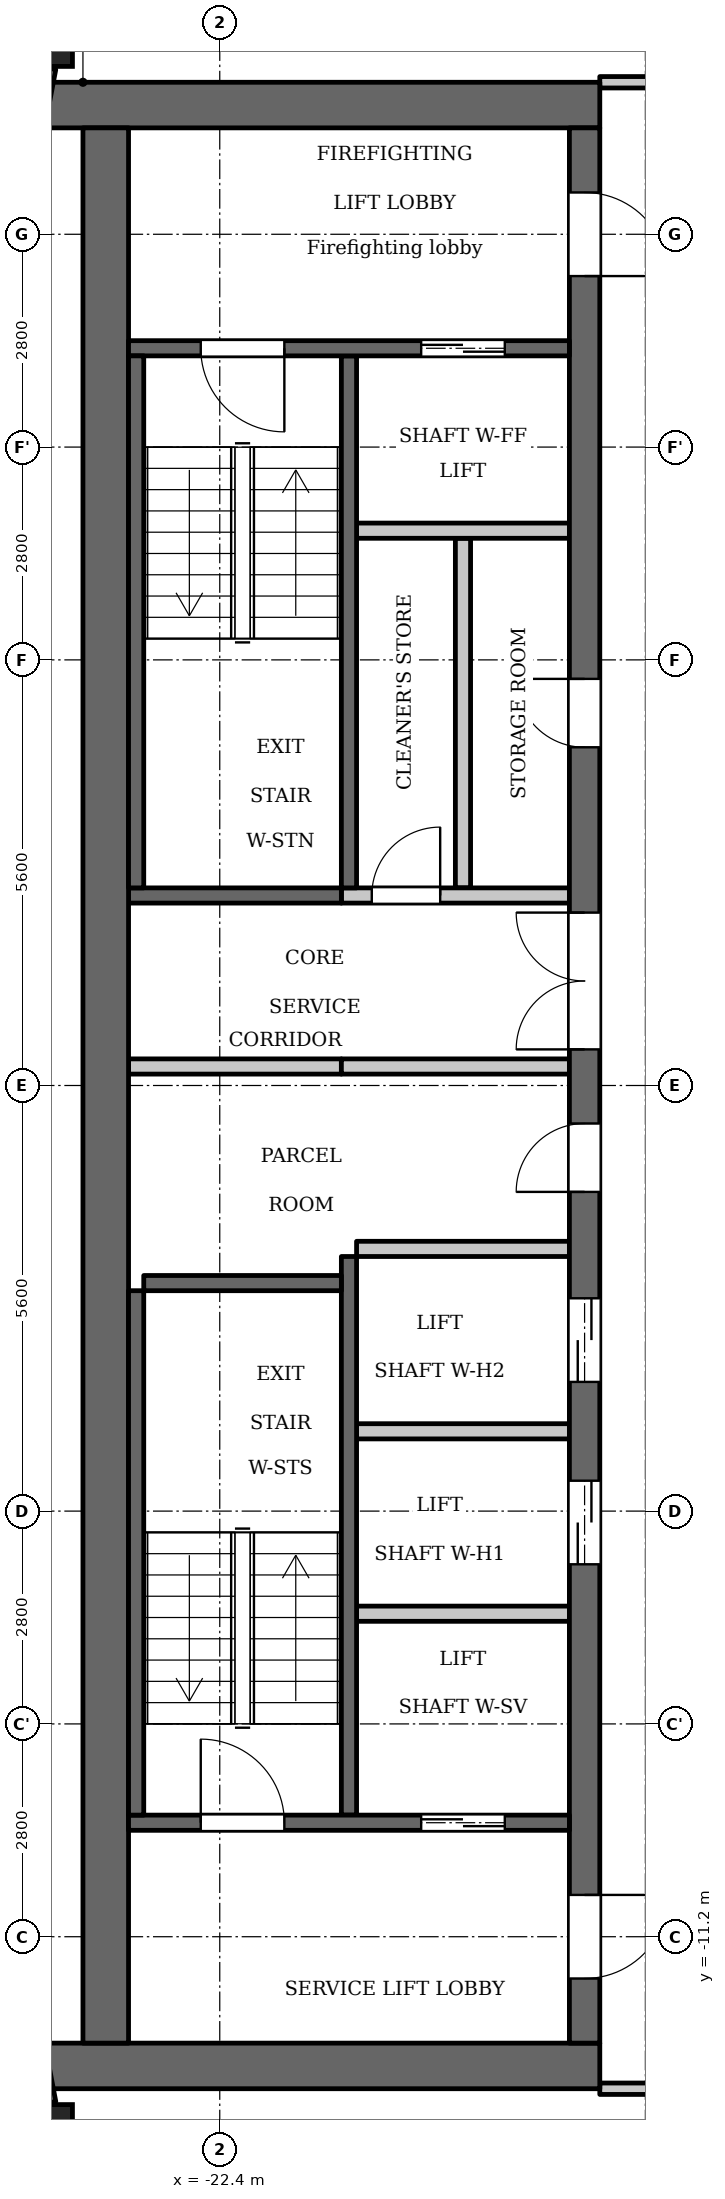
"""IFC4 building model, lengths in metres.
Left out: names, types, materials, properties, quantities, classifications, styles, units other than length and angle.
Written with IfcOpenShell. Run it as: python <this file> out.ifc"""

import sys

from ifc_helpers import new_model, si_unit, direction, frame, frame_2d, origin, origin_2d, place, context, subcontext, project, spatial, rectangle, extrude, element, fill, save


model = new_model("IFC4")
c1 = context("Model", 3, precision=1e-05, world=origin(), true_north=direction((0.0, 1.0)))
c2 = subcontext(c1, "Body", "Model", "MODEL_VIEW")
j1 = project(units=[si_unit("LENGTHUNIT", "METRE"), si_unit("PLANEANGLEUNIT", "RADIAN")], contexts=[c1])
p1 = place(None, origin())
s1 = spatial("IfcSite", under=j1, at=p1, CompositionType="ELEMENT")
p2 = place(p1, origin())
s2 = spatial("IfcBuilding", under=s1, at=p2, CompositionType="ELEMENT")
p3 = place(p2, frame((0.0, 0.0, 248.7)))
s3 = spatial("IfcBuildingStorey", under=s2, at=p3, CompositionType="ELEMENT", Elevation=248.7)
for number, where, z_axis, x_axis in (
    (1, (-24.738, 13.809, 0.0), (0.0, 0.0, 1.0), (1.0, 0.0, 0.0)),
    (2, (-24.738, -13.809, 0.0), (0.0, 0.0, 1.0), (1.0, 0.0, 0.0)),
):
    element("IfcColumn", number, at=place(p3, frame(where, z_axis=z_axis, x_axis=x_axis)), inside=s3, PredefinedType="COLUMN", context=c2, shape_type="SweptSolid", body=[
        extrude(rectangle(XDim=0.8, YDim=0.8, at=origin_2d()), origin(), (0.0, 0.0, 1.0), 3.5),
    ])
for number, where, z_axis, x_axis in (
    (3, (-24.705, 13.395, 0.0), (0.0, 0.0, 1.0), (-0.187, -0.982, 0.0)),
    (4, (-25.053, -11.572, 0.0), (0.0, 0.0, 1.0), (0.187, -0.982, 0.0)),
):
    element("IfcWall", number, at=place(p3, frame(where, z_axis=z_axis, x_axis=x_axis)), inside=s3, PredefinedType="SOLIDWALL", context=c2, shape_type="SweptSolid", body=[
        extrude(rectangle(XDim=1.856, YDim=0.3, at=frame_2d((0.928, 0.0))), origin(), (0.0, 0.0, 1.0), 2.55),
    ])
p4 = place(p3, frame((-20.7, 2.6, 0.0), z_axis=(0.0, 0.0, 1.0), x_axis=(0.0, 1.0, 0.0)))
e5 = element("IfcWall", 5, at=p4, inside=s3, PredefinedType="SHEAR", context=c2, shape_type="SweptSolid", body=[
    extrude(rectangle(XDim=7.0, YDim=0.2, at=frame_2d((3.5, 0.0))), origin(), (0.0, 0.0, 1.0), 3.2),
])
p5 = place(p3, frame((-20.7, -9.6, 0.0), z_axis=(0.0, 0.0, 1.0), x_axis=(0.0, 1.0, 0.0)))
e6 = element("IfcWall", 6, at=p5, inside=s3, PredefinedType="SHEAR", context=c2, shape_type="SweptSolid", body=[
    extrude(rectangle(XDim=7.35, YDim=0.2, at=frame_2d((3.675, 0.0))), origin(), (0.0, 0.0, 1.0), 3.2),
])
p6 = place(p3, frame((-20.8, 2.5, 0.0), z_axis=(0.0, 0.0, 1.0), x_axis=(-1.0, 0.0, 0.0)))
e7 = element("IfcWall", 7, at=p6, inside=s3, PredefinedType="SHEAR", context=c2, shape_type="SweptSolid", body=[
    extrude(rectangle(XDim=2.8, YDim=0.2, at=frame_2d((1.4, 0.0))), origin(), (0.0, 0.0, 1.0), 3.2),
])
p7 = place(p3, frame((-20.8, 0.25, 0.0), z_axis=(0.0, 0.0, 1.0), x_axis=(-1.0, 0.0, 0.0)))
e8 = element("IfcWall", 8, at=p7, inside=s3, PredefinedType="PARTITIONING", context=c2, shape_type="SweptSolid", body=[
    extrude(rectangle(XDim=2.8, YDim=0.2, at=frame_2d((1.4, 0.0))), origin(), (0.0, 0.0, 1.0), 3.2),
])
for number, where, z_axis, x_axis in (
    (9, (-17.4, 12.9, 0.0), (0.0, 0.0, 1.0), (-1.0, 0.0, 0.0)),
    (10, (-17.4, -12.9, 0.0), (0.0, 0.0, 1.0), (-1.0, 0.0, 0.0)),
):
    element("IfcWall", number, at=place(p3, frame(where, z_axis=z_axis, x_axis=x_axis)), inside=s3, PredefinedType="SHEAR", context=c2, shape_type="SweptSolid", body=[
        extrude(rectangle(XDim=7.32, YDim=0.6, at=frame_2d((3.66, 0.0))), origin(), (0.0, 0.0, 1.0), 3.2),
    ])
p8 = place(p3, frame((-19.2, 2.6, 0.0), z_axis=(0.0, 0.0, 1.0), x_axis=(0.0, 1.0, 0.0)))
e11 = element("IfcWall", 11, at=p8, inside=s3, PredefinedType="PARTITIONING", context=c2, shape_type="SweptSolid", body=[
    extrude(rectangle(XDim=4.6, YDim=0.2, at=frame_2d((2.3, 0.0))), origin(), (0.0, 0.0, 1.0), 3.2),
])
p9 = place(p3, frame((-17.6, -12.6, 0.0), z_axis=(0.0, 0.0, 1.0), x_axis=(0.0, 1.0, 0.0)))
e12 = element("IfcWall", 12, at=p9, inside=s3, PredefinedType="SHEAR", context=c2, shape_type="SweptSolid", body=[
    extrude(rectangle(XDim=25.2, YDim=0.4, at=frame_2d((12.6, 0.0))), origin(), (0.0, 0.0, 1.0), 3.2),
])
p10 = place(p9, frame((6.3, 0.0, 0.0)))
e13 = element("IfcOpeningElement", 13, at=p10, cuts=e12, PredefinedType="OPENING", context=c2, shape_type="SweptSolid", body=[
    extrude(rectangle(XDim=1.1, YDim=2.1, at=frame_2d((0.55, 1.05))), frame((0.0, 0.21, 0.0), z_axis=(0.0, -1.0, 0.0), x_axis=(1.0, 0.0, 0.0)), (0.0, 0.0, 1.0), 0.42),
])
p11 = place(p9, frame((8.7, 0.0, 0.0)))
e14 = element("IfcOpeningElement", 14, at=p11, cuts=e12, PredefinedType="OPENING", context=c2, shape_type="SweptSolid", body=[
    extrude(rectangle(XDim=1.1, YDim=2.1, at=frame_2d((0.55, 1.05))), frame((0.0, 0.21, 0.0), z_axis=(0.0, -1.0, 0.0), x_axis=(1.0, 0.0, 0.0)), (0.0, 0.0, 1.0), 0.42),
])
p12 = place(p9, frame((11.2, 0.0, 0.0)))
e15 = element("IfcOpeningElement", 15, at=p12, cuts=e12, PredefinedType="OPENING", context=c2, shape_type="SweptSolid", body=[
    extrude(rectangle(XDim=0.9, YDim=2.1, at=frame_2d((0.45, 1.05))), frame((0.0, 0.21, 0.0), z_axis=(0.0, -1.0, 0.0), x_axis=(1.0, 0.0, 0.0)), (0.0, 0.0, 1.0), 0.42),
])
p13 = place(p9, frame((17.05, 0.0, 0.0)))
e16 = element("IfcOpeningElement", 16, at=p13, cuts=e12, PredefinedType="OPENING", context=c2, shape_type="SweptSolid", body=[
    extrude(rectangle(XDim=0.9, YDim=2.1, at=frame_2d((0.45, 1.05))), frame((0.0, 0.21, 0.0), z_axis=(0.0, -1.0, 0.0), x_axis=(1.0, 0.0, 0.0)), (0.0, 0.0, 1.0), 0.42),
])
p14 = place(p9, frame((23.25, 0.0, 0.0)))
e17 = element("IfcOpeningElement", 17, at=p14, cuts=e12, PredefinedType="OPENING", context=c2, shape_type="SweptSolid", body=[
    extrude(rectangle(XDim=1.1, YDim=2.1, at=frame_2d((0.55, 1.05))), frame((0.0, 0.21, 0.0), z_axis=(0.0, -1.0, 0.0), x_axis=(1.0, 0.0, 0.0)), (0.0, 0.0, 1.0), 0.42),
])
p15 = place(p9, frame((0.85, 0.0, 0.0)))
e18 = element("IfcOpeningElement", 18, at=p15, cuts=e12, PredefinedType="OPENING", context=c2, shape_type="SweptSolid", body=[
    extrude(rectangle(XDim=1.1, YDim=2.1, at=frame_2d((0.55, 1.05))), frame((0.0, 0.21, 0.0), z_axis=(0.0, -1.0, 0.0), x_axis=(1.0, 0.0, 0.0)), (0.0, 0.0, 1.0), 0.42),
])
p16 = place(p9, frame((13.075, 0.0, 0.0)))
e19 = element("IfcOpeningElement", 19, at=p16, cuts=e12, PredefinedType="OPENING", context=c2, shape_type="SweptSolid", body=[
    extrude(rectangle(XDim=1.8, YDim=2.1, at=frame_2d((0.9, 1.05))), frame((0.0, 0.21, 0.0), z_axis=(0.0, -1.0, 0.0), x_axis=(1.0, 0.0, 0.0)), (0.0, 0.0, 1.0), 0.42),
])
p17 = place(p3, frame((-23.9, -12.6, 0.0), z_axis=(0.0, 0.0, 1.0), x_axis=(0.0, 1.0, 0.0)))
e20 = element("IfcWall", 20, at=p17, inside=s3, PredefinedType="SHEAR", context=c2, shape_type="SweptSolid", body=[
    extrude(rectangle(XDim=25.2, YDim=0.6, at=frame_2d((12.6, 0.0))), origin(), (0.0, 0.0, 1.0), 3.2),
])
p18 = place(p3, frame((-17.8, -9.7, 0.0), z_axis=(0.0, 0.0, 1.0), x_axis=(-1.0, 0.0, 0.0)))
e21 = element("IfcWall", 21, at=p18, inside=s3, PredefinedType="SHEAR", context=c2, shape_type="SweptSolid", body=[
    extrude(rectangle(XDim=5.8, YDim=0.2, at=frame_2d((2.9, 0.0))), origin(), (0.0, 0.0, 1.0), 3.2),
])
p19 = place(p18, frame((0.85, 0.0, 0.0)))
e22 = element("IfcOpeningElement", 22, at=p19, cuts=e21, PredefinedType="OPENING", context=c2, shape_type="SweptSolid", body=[
    extrude(rectangle(XDim=1.1, YDim=2.1, at=frame_2d((0.55, 1.05))), frame((0.0, 0.11, 0.0), z_axis=(0.0, -1.0, 0.0), x_axis=(1.0, 0.0, 0.0)), (0.0, 0.0, 1.0), 0.22),
])
p20 = place(p18, frame((3.75, 0.0, 0.0)))
e23 = element("IfcOpeningElement", 23, at=p20, cuts=e21, PredefinedType="OPENING", context=c2, shape_type="SweptSolid", body=[
    extrude(rectangle(XDim=1.1, YDim=2.1, at=frame_2d((0.55, 1.05))), frame((0.0, 0.11, 0.0), z_axis=(0.0, -1.0, 0.0), x_axis=(1.0, 0.0, 0.0)), (0.0, 0.0, 1.0), 0.22),
])
for number, where, z_axis, x_axis in (
    (24, (-17.8, -6.95, 0.0), (0.0, 0.0, 1.0), (-1.0, 0.0, 0.0)),
    (25, (-17.8, -4.55, 0.0), (0.0, 0.0, 1.0), (-1.0, 0.0, 0.0)),
    (26, (-17.8, -2.15, 0.0), (0.0, 0.0, 1.0), (-1.0, 0.0, 0.0)),
):
    element("IfcWall", number, at=place(p3, frame(where, z_axis=z_axis, x_axis=x_axis)), inside=s3, PredefinedType="PARTITIONING", context=c2, shape_type="SweptSolid", body=[
        extrude(rectangle(XDim=2.8, YDim=0.2, at=frame_2d((1.4, 0.0))), origin(), (0.0, 0.0, 1.0), 3.2),
    ])
p21 = place(p3, frame((-17.8, 0.25, 0.0), z_axis=(0.0, 0.0, 1.0), x_axis=(-1.0, 0.0, 0.0)))
e27 = element("IfcWall", 27, at=p21, inside=s3, PredefinedType="PARTITIONING", context=c2, shape_type="SweptSolid", body=[
    extrude(rectangle(XDim=3.0, YDim=0.2, at=frame_2d((1.5, 0.0))), origin(), (0.0, 0.0, 1.0), 3.2),
])
p22 = place(p3, frame((-17.8, 2.5, 0.0), z_axis=(0.0, 0.0, 1.0), x_axis=(-1.0, 0.0, 0.0)))
e28 = element("IfcWall", 28, at=p22, inside=s3, PredefinedType="PARTITIONING", context=c2, shape_type="SweptSolid", body=[
    extrude(rectangle(XDim=3.0, YDim=0.2, at=frame_2d((1.5, 0.0))), origin(), (0.0, 0.0, 1.0), 3.2),
])
p23 = place(p22, frame((1.7, 0.0, 0.0)))
e29 = element("IfcOpeningElement", 29, at=p23, cuts=e28, PredefinedType="OPENING", context=c2, shape_type="SweptSolid", body=[
    extrude(rectangle(XDim=0.9, YDim=2.1, at=frame_2d((0.45, 1.05))), frame((0.0, 0.11, 0.0), z_axis=(0.0, -1.0, 0.0), x_axis=(1.0, 0.0, 0.0)), (0.0, 0.0, 1.0), 0.22),
])
p24 = place(p3, frame((-17.8, 7.3, 0.0), z_axis=(0.0, 0.0, 1.0), x_axis=(-1.0, 0.0, 0.0)))
e30 = element("IfcWall", 30, at=p24, inside=s3, PredefinedType="PARTITIONING", context=c2, shape_type="SweptSolid", body=[
    extrude(rectangle(XDim=2.8, YDim=0.2, at=frame_2d((1.4, 0.0))), origin(), (0.0, 0.0, 1.0), 3.2),
])
p25 = place(p3, frame((-17.8, 9.7, 0.0), z_axis=(0.0, 0.0, 1.0), x_axis=(-1.0, 0.0, 0.0)))
e31 = element("IfcWall", 31, at=p25, inside=s3, PredefinedType="SHEAR", context=c2, shape_type="SweptSolid", body=[
    extrude(rectangle(XDim=5.8, YDim=0.2, at=frame_2d((2.9, 0.0))), origin(), (0.0, 0.0, 1.0), 3.2),
])
p26 = place(p25, frame((0.85, 0.0, 0.0)))
e32 = element("IfcOpeningElement", 32, at=p26, cuts=e31, PredefinedType="OPENING", context=c2, shape_type="SweptSolid", body=[
    extrude(rectangle(XDim=1.1, YDim=2.1, at=frame_2d((0.55, 1.05))), frame((0.0, 0.11, 0.0), z_axis=(0.0, -1.0, 0.0), x_axis=(1.0, 0.0, 0.0)), (0.0, 0.0, 1.0), 0.22),
])
p27 = place(p25, frame((3.75, 0.0, 0.0)))
e33 = element("IfcOpeningElement", 33, at=p27, cuts=e31, PredefinedType="OPENING", context=c2, shape_type="SweptSolid", body=[
    extrude(rectangle(XDim=1.1, YDim=2.1, at=frame_2d((0.55, 1.05))), frame((0.0, 0.11, 0.0), z_axis=(0.0, -1.0, 0.0), x_axis=(1.0, 0.0, 0.0)), (0.0, 0.0, 1.0), 0.22),
])
p28 = place(p3, frame((-23.5, 2.6, 0.0), z_axis=(0.0, 0.0, 1.0), x_axis=(0.0, 1.0, 0.0)))
e34 = element("IfcWall", 34, at=p28, inside=s3, PredefinedType="SHEAR", context=c2, shape_type="SweptSolid", body=[
    extrude(rectangle(XDim=7.0, YDim=0.2, at=frame_2d((3.5, 0.0))), origin(), (0.0, 0.0, 1.0), 3.2),
])
p29 = place(p3, frame((-23.5, -9.6, 0.0), z_axis=(0.0, 0.0, 1.0), x_axis=(0.0, 1.0, 0.0)))
e35 = element("IfcWall", 35, at=p29, inside=s3, PredefinedType="SHEAR", context=c2, shape_type="SweptSolid", body=[
    extrude(rectangle(XDim=6.9, YDim=0.2, at=frame_2d((3.45, 0.0))), origin(), (0.0, 0.0, 1.0), 3.2),
])
p30 = place(p3, frame((-20.8, -2.6, 0.0), z_axis=(0.0, 0.0, 1.0), x_axis=(-1.0, 0.0, 0.0)))
e36 = element("IfcWall", 36, at=p30, inside=s3, PredefinedType="SHEAR", context=c2, shape_type="SweptSolid", body=[
    extrude(rectangle(XDim=2.6, YDim=0.2, at=frame_2d((1.3, 0.0))), origin(), (0.0, 0.0, 1.0), 3.2),
])
p31 = place(p3, frame((-17.4, -13.2, 0.0), z_axis=(0.0, 0.0, 1.0), x_axis=(1.0, 0.0, 0.0)))
e37 = element("IfcWall", 37, at=p31, inside=s3, PredefinedType="PARTITIONING", context=c2, shape_type="SweptSolid", body=[
    extrude(rectangle(XDim=2.325, YDim=0.15, at=frame_2d((1.163, 0.0))), origin(), (0.0, 0.0, 1.0), 3.2),
])
p32 = place(p31, frame((0.65, 0.0, 0.0)))
e38 = element("IfcOpeningElement", 38, at=p32, cuts=e37, PredefinedType="OPENING", context=c2, shape_type="SweptSolid", body=[
    extrude(rectangle(XDim=1.0, YDim=2.1, at=frame_2d((0.5, 1.05))), frame((0.0, 0.085, 0.0), z_axis=(0.0, -1.0, 0.0), x_axis=(1.0, 0.0, 0.0)), (0.0, 0.0, 1.0), 0.17),
])
p33 = place(p3, frame((-17.4, 13.2, 0.0), z_axis=(0.0, 0.0, 1.0), x_axis=(1.0, 0.0, 0.0)))
e39 = element("IfcWall", 39, at=p33, inside=s3, PredefinedType="PARTITIONING", context=c2, shape_type="SweptSolid", body=[
    extrude(rectangle(XDim=2.325, YDim=0.15, at=frame_2d((1.163, 0.0))), origin(), (0.0, 0.0, 1.0), 3.2),
])
p34 = place(p33, frame((0.75, 0.0, 0.0)))
e40 = element("IfcOpeningElement", 40, at=p34, cuts=e39, PredefinedType="OPENING", context=c2, shape_type="SweptSolid", body=[
    extrude(rectangle(XDim=1.0, YDim=2.1, at=frame_2d((0.5, 1.05))), frame((0.0, 0.085, 0.0), z_axis=(0.0, -1.0, 0.0), x_axis=(1.0, 0.0, 0.0)), (0.0, 0.0, 1.0), 0.17),
])
p35 = place(p19, origin())
e41 = element("IfcDoor", 41, at=p35, inside=s3, OperationType="DOUBLE_DOOR_SLIDING", PredefinedType="DOOR", context=c2, shape_type="SweptSolid", body=[
    extrude(rectangle(XDim=1.1, YDim=2.1, at=frame_2d((0.55, 1.05))), frame((0.0, 0.025, 0.0), z_axis=(0.0, -1.0, 0.0), x_axis=(1.0, 0.0, 0.0)), (0.0, 0.0, 1.0), 0.05),
])
fill(e22, e41)
p36 = place(p10, origin())
e42 = element("IfcDoor", 42, at=p36, inside=s3, OperationType="DOUBLE_DOOR_SLIDING", PredefinedType="DOOR", context=c2, shape_type="SweptSolid", body=[
    extrude(rectangle(XDim=1.1, YDim=2.1, at=frame_2d((0.55, 1.05))), frame((0.0, 0.025, 0.0), z_axis=(0.0, -1.0, 0.0), x_axis=(1.0, 0.0, 0.0)), (0.0, 0.0, 1.0), 0.05),
])
fill(e13, e42)
p37 = place(p11, origin())
e43 = element("IfcDoor", 43, at=p37, inside=s3, OperationType="DOUBLE_DOOR_SLIDING", PredefinedType="DOOR", context=c2, shape_type="SweptSolid", body=[
    extrude(rectangle(XDim=1.1, YDim=2.1, at=frame_2d((0.55, 1.05))), frame((0.0, 0.025, 0.0), z_axis=(0.0, -1.0, 0.0), x_axis=(1.0, 0.0, 0.0)), (0.0, 0.0, 1.0), 0.05),
])
fill(e14, e43)
p38 = place(p12, origin())
e44 = element("IfcDoor", 44, at=p38, inside=s3, OperationType="SINGLE_SWING_RIGHT", PredefinedType="DOOR", context=c2, shape_type="SweptSolid", body=[
    extrude(rectangle(XDim=0.9, YDim=2.1, at=frame_2d((0.45, 1.05))), frame((0.0, 0.025, 0.0), z_axis=(0.0, -1.0, 0.0), x_axis=(1.0, 0.0, 0.0)), (0.0, 0.0, 1.0), 0.05),
])
fill(e15, e44)
p39 = place(p13, origin())
e45 = element("IfcDoor", 45, at=p39, inside=s3, OperationType="SINGLE_SWING_LEFT", PredefinedType="DOOR", context=c2, shape_type="SweptSolid", body=[
    extrude(rectangle(XDim=0.9, YDim=2.1, at=frame_2d((0.45, 1.05))), frame((0.0, 0.025, 0.0), z_axis=(0.0, -1.0, 0.0), x_axis=(1.0, 0.0, 0.0)), (0.0, 0.0, 1.0), 0.05),
])
fill(e16, e45)
p40 = place(p23, origin())
e46 = element("IfcDoor", 46, at=p40, inside=s3, OperationType="SINGLE_SWING_LEFT", PredefinedType="DOOR", context=c2, shape_type="SweptSolid", body=[
    extrude(rectangle(XDim=0.9, YDim=2.1, at=frame_2d((0.45, 1.05))), frame((0.0, 0.025, 0.0), z_axis=(0.0, -1.0, 0.0), x_axis=(1.0, 0.0, 0.0)), (0.0, 0.0, 1.0), 0.05),
])
fill(e29, e46)
p41 = place(p26, origin())
e47 = element("IfcDoor", 47, at=p41, inside=s3, OperationType="DOUBLE_DOOR_SLIDING", PredefinedType="DOOR", context=c2, shape_type="SweptSolid", body=[
    extrude(rectangle(XDim=1.1, YDim=2.1, at=frame_2d((0.55, 1.05))), frame((0.0, 0.025, 0.0), z_axis=(0.0, -1.0, 0.0), x_axis=(1.0, 0.0, 0.0)), (0.0, 0.0, 1.0), 0.05),
])
fill(e32, e47)
p42 = place(p14, origin())
e48 = element("IfcDoor", 48, at=p42, inside=s3, OperationType="SINGLE_SWING_LEFT", PredefinedType="DOOR", context=c2, shape_type="SweptSolid", body=[
    extrude(rectangle(XDim=1.1, YDim=2.1, at=frame_2d((0.55, 1.05))), frame((0.0, 0.025, 0.0), z_axis=(0.0, -1.0, 0.0), x_axis=(1.0, 0.0, 0.0)), (0.0, 0.0, 1.0), 0.05),
])
fill(e17, e48)
p43 = place(p15, origin())
e49 = element("IfcDoor", 49, at=p43, inside=s3, OperationType="SINGLE_SWING_RIGHT", PredefinedType="DOOR", context=c2, shape_type="SweptSolid", body=[
    extrude(rectangle(XDim=1.1, YDim=2.1, at=frame_2d((0.55, 1.05))), frame((0.0, 0.025, 0.0), z_axis=(0.0, -1.0, 0.0), x_axis=(1.0, 0.0, 0.0)), (0.0, 0.0, 1.0), 0.05),
])
fill(e18, e49)
p44 = place(p27, origin())
e50 = element("IfcDoor", 50, at=p44, inside=s3, OperationType="SINGLE_SWING_RIGHT", PredefinedType="DOOR", context=c2, shape_type="SweptSolid", body=[
    extrude(rectangle(XDim=1.1, YDim=2.1, at=frame_2d((0.55, 1.05))), frame((0.0, 0.025, 0.0), z_axis=(0.0, -1.0, 0.0), x_axis=(1.0, 0.0, 0.0)), (0.0, 0.0, 1.0), 0.05),
])
fill(e33, e50)
p45 = place(p20, origin())
e51 = element("IfcDoor", 51, at=p45, inside=s3, OperationType="SINGLE_SWING_RIGHT", PredefinedType="DOOR", context=c2, shape_type="SweptSolid", body=[
    extrude(rectangle(XDim=1.1, YDim=2.1, at=frame_2d((0.55, 1.05))), frame((0.0, 0.025, 0.0), z_axis=(0.0, -1.0, 0.0), x_axis=(1.0, 0.0, 0.0)), (0.0, 0.0, 1.0), 0.05),
])
fill(e23, e51)
p46 = place(p16, origin())
e52 = element("IfcDoor", 52, at=p46, inside=s3, OperationType="DOUBLE_DOOR_SINGLE_SWING", PredefinedType="DOOR", context=c2, shape_type="SweptSolid", body=[
    extrude(rectangle(XDim=1.8, YDim=2.1, at=frame_2d((0.9, 1.05))), frame((0.0, 0.025, 0.0), z_axis=(0.0, -1.0, 0.0), x_axis=(1.0, 0.0, 0.0)), (0.0, 0.0, 1.0), 0.05),
])
fill(e19, e52)
save(model, sys.argv[1])
